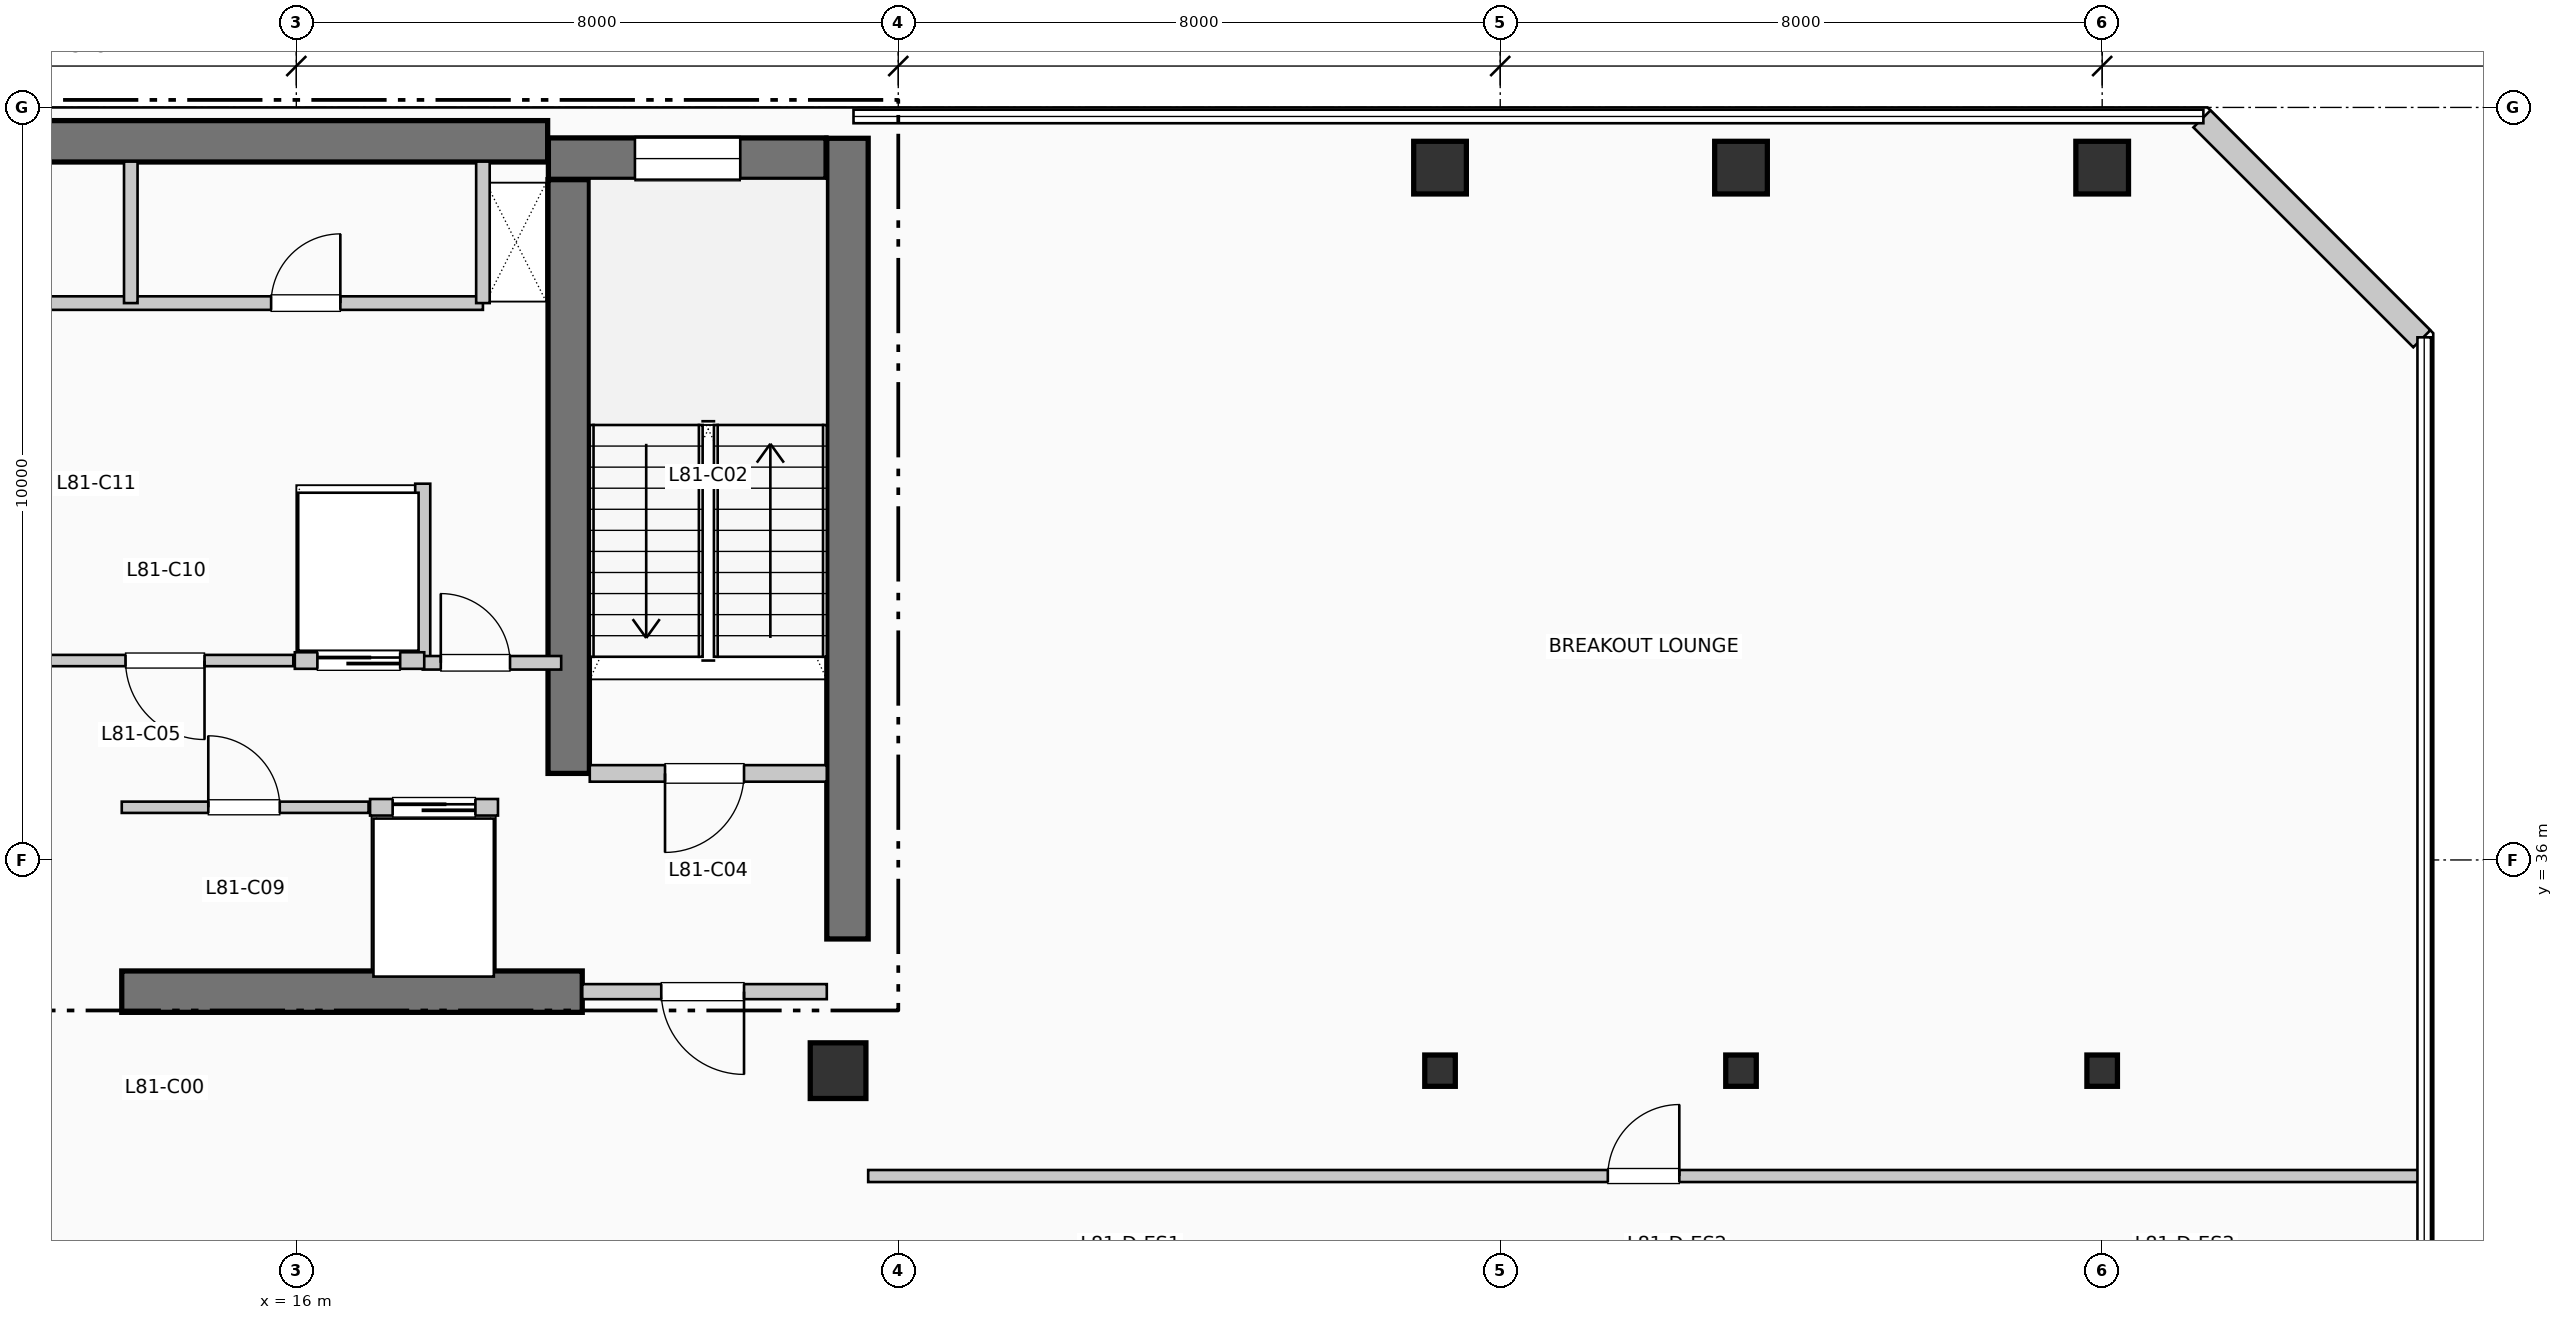
"""IFC4 building model, lengths in metres.
Left out: names, types, materials, properties, quantities, classifications, styles, units other than length and angle.
Written with IfcOpenShell. Run it as: python <this file> out.ifc"""

import sys

from ifc_helpers import new_model, si_unit, direction, frame, frame_2d, origin, origin_2d, place, context, subcontext, project, spatial, rectangle, i_section, extrude, element, fill, save


model = new_model("IFC4")
c1 = context("Model", 3, precision=1e-05, world=origin(), true_north=direction((0.0, 1.0)))
c2 = subcontext(c1, "Body", "Model", "MODEL_VIEW")
j1 = project(units=[si_unit("LENGTHUNIT", "METRE"), si_unit("PLANEANGLEUNIT", "RADIAN")], contexts=[c1])
p1 = place(None, origin())
s1 = spatial("IfcSite", under=j1, at=p1, CompositionType="ELEMENT")
p2 = place(p1, origin())
s2 = spatial("IfcBuilding", under=s1, at=p2, CompositionType="ELEMENT")
p3 = place(p2, frame((0.0, 0.0, 331.65)))
s3 = spatial("IfcBuildingStorey", under=s2, at=p3, CompositionType="ELEMENT", Elevation=331.65)
p4 = place(p3, frame((5.36, 45.55, 0.0), z_axis=(0.0, 0.0, 1.0), x_axis=(1.0, 0.0, 0.0)))
e1 = element("IfcWall", 1, at=p4, inside=s3, PredefinedType="SHEAR", context=c2, shape_type="SweptSolid", body=[
    extrude(rectangle(XDim=13.98, YDim=0.55, at=frame_2d((6.99, 0.0))), origin(), (0.0, 0.0, 1.0), 3.96),
])
p5 = place(p3, frame((23.325, 34.95, 0.0), z_axis=(0.0, 0.0, 1.0), x_axis=(0.0, 1.0, 0.0)))
e2 = element("IfcWall", 2, at=p5, inside=s3, PredefinedType="SHEAR", context=c2, shape_type="SweptSolid", body=[
    extrude(rectangle(XDim=10.64, YDim=0.55, at=frame_2d((5.32, 0.0))), origin(), (0.0, 0.0, 1.0), 3.96),
])
p6 = place(p3, frame((13.68, 34.25, 0.0), z_axis=(0.0, 0.0, 1.0), x_axis=(1.0, 0.0, 0.0)))
e3 = element("IfcWall", 3, at=p6, inside=s3, PredefinedType="SHEAR", context=c2, shape_type="SweptSolid", body=[
    extrude(rectangle(XDim=6.12, YDim=0.55, at=frame_2d((3.06, 0.0))), origin(), (0.0, 0.0, 1.0), 3.96),
])
p7 = place(p3, frame((19.62, 37.15, 0.0), z_axis=(0.0, 0.0, 1.0), x_axis=(0.0, 1.0, 0.0)))
e4 = element("IfcWall", 4, at=p7, inside=s3, PredefinedType="SHEAR", context=c2, shape_type="SweptSolid", body=[
    extrude(rectangle(XDim=7.89, YDim=0.55, at=frame_2d((3.945, 0.0))), origin(), (0.0, 0.0, 1.0), 3.96),
])
p8 = place(p3, frame((19.35, 45.32, 0.0), z_axis=(0.0, 0.0, 1.0), x_axis=(1.0, 0.0, 0.0)))
e5 = element("IfcWall", 5, at=p8, inside=s3, PredefinedType="SHEAR", context=c2, shape_type="SweptSolid", body=[
    extrude(rectangle(XDim=3.69, YDim=0.55, at=frame_2d((1.845, 0.0))), origin(), (0.0, 0.0, 1.0), 3.96),
])
p9 = place(p8, frame((1.15, 0.0, 1.05)))
e6 = element("IfcOpeningElement", 6, at=p9, cuts=e5, PredefinedType="OPENING", context=c2, shape_type="SweptSolid", body=[
    extrude(rectangle(XDim=1.4, YDim=1.8, at=frame_2d((0.7, 0.9))), frame((0.0, 0.285, 0.0), z_axis=(0.0, -1.0, 0.0), x_axis=(1.0, 0.0, 0.0)), (0.0, 0.0, 1.0), 0.57),
])
p10 = place(p3, frame((23.2, 33.2, 0.0), z_axis=(0.0, 0.0, 1.0), x_axis=(1.0, 0.0, 0.0)))
e7 = element("IfcColumn", 7, at=p10, inside=s3, PredefinedType="COLUMN", context=c2, shape_type="SweptSolid", body=[
    extrude(rectangle(XDim=0.74, YDim=0.74, at=origin_2d()), origin(), (0.0, 0.0, 1.0), 3.96),
])
p11 = place(p3, frame((31.2, 33.2, 0.0), z_axis=(0.0, 0.0, 1.0), x_axis=(1.0, 0.0, 0.0)))
e8 = element("IfcColumn", 8, at=p11, inside=s3, PredefinedType="COLUMN", context=c2, shape_type="SweptSolid", body=[
    extrude(i_section(OverallWidth=0.406, OverallDepth=0.416, WebThickness=0.022, FlangeThickness=0.036, at=origin_2d()), origin(), (0.0, 0.0, 1.0), 3.96),
])
p12 = place(p3, frame((31.2, 45.2, 0.0), z_axis=(0.0, 0.0, 1.0), x_axis=(1.0, 0.0, 0.0)))
e9 = element("IfcColumn", 9, at=p12, inside=s3, PredefinedType="COLUMN", context=c2, shape_type="SweptSolid", body=[
    extrude(rectangle(XDim=0.7, YDim=0.7, at=origin_2d()), origin(), (0.0, 0.0, 1.0), 3.96),
])
p13 = place(p3, frame((35.2, 33.2, 0.0), z_axis=(0.0, 0.0, 1.0), x_axis=(1.0, 0.0, 0.0)))
e10 = element("IfcColumn", 10, at=p13, inside=s3, PredefinedType="COLUMN", context=c2, shape_type="SweptSolid", body=[
    extrude(i_section(OverallWidth=0.406, OverallDepth=0.416, WebThickness=0.022, FlangeThickness=0.036, at=origin_2d()), origin(), (0.0, 0.0, 1.0), 3.96),
])
p14 = place(p3, frame((35.2, 45.2, 0.0), z_axis=(0.0, 0.0, 1.0), x_axis=(1.0, 0.0, 0.0)))
e11 = element("IfcColumn", 11, at=p14, inside=s3, PredefinedType="COLUMN", context=c2, shape_type="SweptSolid", body=[
    extrude(rectangle(XDim=0.7, YDim=0.7, at=origin_2d()), origin(), (0.0, 0.0, 1.0), 3.96),
])
p15 = place(p3, frame((40.0, 33.2, 0.0), z_axis=(0.0, 0.0, 1.0), x_axis=(1.0, 0.0, 0.0)))
e12 = element("IfcColumn", 12, at=p15, inside=s3, PredefinedType="COLUMN", context=c2, shape_type="SweptSolid", body=[
    extrude(i_section(OverallWidth=0.406, OverallDepth=0.416, WebThickness=0.022, FlangeThickness=0.036, at=origin_2d()), origin(), (0.0, 0.0, 1.0), 3.96),
])
p16 = place(p3, frame((40.0, 45.2, 0.0), z_axis=(0.0, 0.0, 1.0), x_axis=(1.0, 0.0, 0.0)))
e13 = element("IfcColumn", 13, at=p16, inside=s3, PredefinedType="COLUMN", context=c2, shape_type="SweptSolid", body=[
    extrude(rectangle(XDim=0.7, YDim=0.7, at=origin_2d()), origin(), (0.0, 0.0, 1.0), 3.96),
])
p17 = place(p3, frame((44.248, 42.926, 0.0), z_axis=(0.0, 0.0, 1.0), x_axis=(-0.707136318428, 0.707077242712, 0.0)))
e14 = element("IfcWall", 14, at=p17, inside=s3, PredefinedType="SOLIDWALL", context=c2, shape_type="SweptSolid", body=[
    extrude(rectangle(XDim=4.133, YDim=0.32, at=frame_2d((2.066, 0.0))), origin(), (0.0, 0.0, 1.0), 3.74),
])
p18 = place(p3, frame((19.9, 37.15, 0.0), z_axis=(0.0, 0.0, 1.0), x_axis=(1.0, 0.0, 0.0)))
e15 = element("IfcWall", 15, at=p18, inside=s3, PredefinedType="PARTITIONING", context=c2, shape_type="SweptSolid", body=[
    extrude(rectangle(XDim=3.15, YDim=0.22, at=frame_2d((1.575, 0.0))), origin(), (0.0, 0.0, 1.0), 3.74),
])
p19 = place(p18, frame((2.05, 0.0, 0.0), z_axis=(0.0, 0.0, 1.0), x_axis=(-1.0, 0.0, 0.0)))
e16 = element("IfcOpeningElement", 16, at=p19, cuts=e15, PredefinedType="OPENING", context=c2, shape_type="SweptSolid", body=[
    extrude(rectangle(XDim=1.05, YDim=2.15, at=frame_2d((0.525, 1.075))), frame((0.0, 0.12, 0.0), z_axis=(0.0, -1.0, 0.0), x_axis=(1.0, 0.0, 0.0)), (0.0, 0.0, 1.0), 0.24),
])
p20 = place(p3, frame((19.8, 34.25, 0.0), z_axis=(0.0, 0.0, 1.0), x_axis=(1.0, 0.0, 0.0)))
e17 = element("IfcWall", 17, at=p20, inside=s3, PredefinedType="PARTITIONING", context=c2, shape_type="SweptSolid", body=[
    extrude(rectangle(XDim=3.25, YDim=0.2, at=frame_2d((1.625, 0.0))), origin(), (0.0, 0.0, 1.0), 3.74),
])
p21 = place(p20, frame((2.15, 0.0, 0.0), z_axis=(0.0, 0.0, 1.0), x_axis=(-1.0, 0.0, 0.0)))
e18 = element("IfcOpeningElement", 18, at=p21, cuts=e17, PredefinedType="OPENING", context=c2, shape_type="SweptSolid", body=[
    extrude(rectangle(XDim=1.1, YDim=2.15, at=frame_2d((0.55, 1.075))), frame((0.0, 0.11, 0.0), z_axis=(0.0, -1.0, 0.0), x_axis=(1.0, 0.0, 0.0)), (0.0, 0.0, 1.0), 0.22),
])
p22 = place(p3, frame((17.68, 38.65, 0.0), z_axis=(0.0, 0.0, 1.0), x_axis=(0.0, 1.0, 0.0)))
e19 = element("IfcWall", 19, at=p22, inside=s3, PredefinedType="PARTITIONING", context=c2, shape_type="SweptSolid", body=[
    extrude(rectangle(XDim=2.35, YDim=0.2, at=frame_2d((1.175, 0.0))), origin(), (0.0, 0.0, 1.0), 3.74),
])
p23 = place(p3, frame((17.68, 38.62, 0.0), z_axis=(0.0, 0.0, 1.0), x_axis=(1.0, 0.0, 0.0)))
e20 = element("IfcWall", 20, at=p23, inside=s3, PredefinedType="PARTITIONING", context=c2, shape_type="SweptSolid", body=[
    extrude(rectangle(XDim=1.84, YDim=0.18, at=frame_2d((0.92, 0.0))), origin(), (0.0, 0.0, 1.0), 3.74),
])
p24 = place(p23, frame((0.24, 0.0, 0.0)))
e21 = element("IfcOpeningElement", 21, at=p24, cuts=e20, PredefinedType="OPENING", context=c2, shape_type="SweptSolid", body=[
    extrude(rectangle(XDim=0.92, YDim=2.1, at=frame_2d((0.46, 1.05))), frame((0.0, 0.1, 0.0), z_axis=(0.0, -1.0, 0.0), x_axis=(1.0, 0.0, 0.0)), (0.0, 0.0, 1.0), 0.2),
])
p25 = place(p3, frame((13.68, 36.7, 0.0), z_axis=(0.0, 0.0, 1.0), x_axis=(1.0, 0.0, 0.0)))
e22 = element("IfcWall", 22, at=p25, inside=s3, PredefinedType="PARTITIONING", context=c2, shape_type="SweptSolid", body=[
    extrude(rectangle(XDim=3.28, YDim=0.15, at=frame_2d((1.64, 0.0))), origin(), (0.0, 0.0, 1.0), 3.74),
])
p26 = place(p25, frame((1.15, 0.0, 0.0)))
e23 = element("IfcOpeningElement", 23, at=p26, cuts=e22, PredefinedType="OPENING", context=c2, shape_type="SweptSolid", body=[
    extrude(rectangle(XDim=0.95, YDim=2.15, at=frame_2d((0.475, 1.075))), frame((0.0, 0.085, 0.0), z_axis=(0.0, -1.0, 0.0), x_axis=(1.0, 0.0, 0.0)), (0.0, 0.0, 1.0), 0.17),
])
p27 = place(p3, frame((12.58, 38.65, 0.0), z_axis=(0.0, 0.0, 1.0), x_axis=(1.0, 0.0, 0.0)))
e24 = element("IfcWall", 24, at=p27, inside=s3, PredefinedType="PARTITIONING", context=c2, shape_type="SweptSolid", body=[
    extrude(rectangle(XDim=3.38, YDim=0.15, at=frame_2d((1.69, 0.0))), origin(), (0.0, 0.0, 1.0), 3.74),
])
p28 = place(p27, frame((2.2, 0.0, 0.0), z_axis=(0.0, 0.0, 1.0), x_axis=(-1.0, 0.0, 0.0)))
e25 = element("IfcOpeningElement", 25, at=p28, cuts=e24, PredefinedType="OPENING", context=c2, shape_type="SweptSolid", body=[
    extrude(rectangle(XDim=1.05, YDim=2.15, at=frame_2d((0.525, 1.075))), frame((0.0, 0.085, 0.0), z_axis=(0.0, -1.0, 0.0), x_axis=(1.0, 0.0, 0.0)), (0.0, 0.0, 1.0), 0.17),
])
p29 = place(p3, frame((16.98, 36.7, 0.0), z_axis=(0.0, 0.0, 1.0), x_axis=(1.0, 0.0, 0.0)))
e26 = element("IfcWall", 26, at=p29, inside=s3, PredefinedType="PARTITIONING", context=c2, shape_type="SweptSolid", body=[
    extrude(rectangle(XDim=1.7, YDim=0.22, at=frame_2d((0.85, 0.0))), origin(), (0.0, 0.0, 1.0), 3.74),
])
p30 = place(p29, frame((0.3, 0.0, 0.0)))
e27 = element("IfcOpeningElement", 27, at=p30, cuts=e26, PredefinedType="OPENING", context=c2, shape_type="SweptSolid", body=[
    extrude(rectangle(XDim=1.1, YDim=2.2, at=frame_2d((0.55, 1.1))), frame((0.0, 0.12, 0.0), z_axis=(0.0, -1.0, 0.0), x_axis=(1.0, 0.0, 0.0)), (0.0, 0.0, 1.0), 0.24),
])
p31 = place(p3, frame((15.98, 38.65, 0.0), z_axis=(0.0, 0.0, 1.0), x_axis=(1.0, 0.0, 0.0)))
e28 = element("IfcWall", 28, at=p31, inside=s3, PredefinedType="PARTITIONING", context=c2, shape_type="SweptSolid", body=[
    extrude(rectangle(XDim=1.72, YDim=0.22, at=frame_2d((0.86, 0.0))), origin(), (0.0, 0.0, 1.0), 3.74),
])
p32 = place(p31, frame((0.3, 0.0, 0.0)))
e29 = element("IfcOpeningElement", 29, at=p32, cuts=e28, PredefinedType="OPENING", context=c2, shape_type="SweptSolid", body=[
    extrude(rectangle(XDim=1.1, YDim=2.2, at=frame_2d((0.55, 1.1))), frame((0.0, 0.12, 0.0), z_axis=(0.0, -1.0, 0.0), x_axis=(1.0, 0.0, 0.0)), (0.0, 0.0, 1.0), 0.24),
])
p33 = place(p3, frame((9.15, 43.4, 0.0), z_axis=(0.0, 0.0, 1.0), x_axis=(1.0, 0.0, 0.0)))
e30 = element("IfcWall", 30, at=p33, inside=s3, PredefinedType="PLUMBINGWALL", context=c2, shape_type="SweptSolid", body=[
    extrude(rectangle(XDim=9.33, YDim=0.18, at=frame_2d((4.665, 0.0))), origin(), (0.0, 0.0, 1.0), 3.74),
])
p34 = place(p33, frame((1.88, 0.0, 0.0)))
e31 = element("IfcOpeningElement", 31, at=p34, cuts=e30, PredefinedType="OPENING", context=c2, shape_type="SweptSolid", body=[
    extrude(rectangle(XDim=0.92, YDim=2.1, at=frame_2d((0.46, 1.05))), frame((0.0, 0.1, 0.0), z_axis=(0.0, -1.0, 0.0), x_axis=(1.0, 0.0, 0.0)), (0.0, 0.0, 1.0), 0.2),
])
p35 = place(p33, frame((6.515, 0.0, 0.0)))
e32 = element("IfcOpeningElement", 32, at=p35, cuts=e30, PredefinedType="OPENING", context=c2, shape_type="SweptSolid", body=[
    extrude(rectangle(XDim=0.92, YDim=2.1, at=frame_2d((0.46, 1.05))), frame((0.0, 0.1, 0.0), z_axis=(0.0, -1.0, 0.0), x_axis=(1.0, 0.0, 0.0)), (0.0, 0.0, 1.0), 0.2),
])
for number, where, z_axis, x_axis in (
    (33, (18.48, 43.4, 0.0), (0.0, 0.0, 1.0), (0.0, 1.0, 0.0)),
    (34, (13.8, 43.4, 0.0), (0.0, 0.0, 1.0), (0.0, 1.0, 0.0)),
):
    element("IfcWall", number, at=place(p3, frame(where, z_axis=z_axis, x_axis=x_axis)), inside=s3, PredefinedType="PLUMBINGWALL", context=c2, shape_type="SweptSolid", body=[
        extrude(rectangle(XDim=1.88, YDim=0.18, at=frame_2d((0.94, 0.0))), origin(), (0.0, 0.0, 1.0), 3.74),
    ])
p36 = place(p3, frame((23.6, 31.8, 0.0), z_axis=(0.0, 0.0, 1.0), x_axis=(1.0, 0.0, 0.0)))
e35 = element("IfcWall", 35, at=p36, inside=s3, PredefinedType="PARTITIONING", context=c2, shape_type="SweptSolid", body=[
    extrude(rectangle(XDim=20.61, YDim=0.16, at=frame_2d((10.305, 0.0))), origin(), (0.0, 0.0, 1.0), 3.74),
])
p37 = place(p36, frame((9.83, 0.0, 0.0)))
e36 = element("IfcOpeningElement", 36, at=p37, cuts=e35, PredefinedType="OPENING", context=c2, shape_type="SweptSolid", body=[
    extrude(rectangle(XDim=0.95, YDim=2.15, at=frame_2d((0.475, 1.075))), frame((0.0, 0.09, 0.0), z_axis=(0.0, -1.0, 0.0), x_axis=(1.0, 0.0, 0.0)), (0.0, 0.0, 1.0), 0.18),
])
p38 = place(p9, origin())
e37 = element("IfcWindow", 37, at=p38, inside=s3, PartitioningType="SINGLE_PANEL", PredefinedType="WINDOW", context=c2, shape_type="SweptSolid", body=[
    extrude(rectangle(XDim=1.4, YDim=1.8, at=frame_2d((0.7, 0.9))), frame((0.0, 0.03, 0.0), z_axis=(0.0, -1.0, 0.0), x_axis=(1.0, 0.0, 0.0)), (0.0, 0.0, 1.0), 0.06),
])
fill(e6, e37)
p39 = place(p19, origin())
e38 = element("IfcDoor", 38, at=p39, inside=s3, OperationType="SINGLE_SWING_LEFT", PredefinedType="DOOR", context=c2, shape_type="SweptSolid", body=[
    extrude(rectangle(XDim=1.05, YDim=2.15, at=frame_2d((0.525, 1.075))), frame((0.0, 0.025, 0.0), z_axis=(0.0, -1.0, 0.0), x_axis=(1.0, 0.0, 0.0)), (0.0, 0.0, 1.0), 0.05),
])
fill(e16, e38)
p40 = place(p21, origin())
e39 = element("IfcDoor", 39, at=p40, inside=s3, OperationType="SINGLE_SWING_RIGHT", PredefinedType="DOOR", context=c2, shape_type="SweptSolid", body=[
    extrude(rectangle(XDim=1.1, YDim=2.15, at=frame_2d((0.55, 1.075))), frame((0.0, 0.025, 0.0), z_axis=(0.0, -1.0, 0.0), x_axis=(1.0, 0.0, 0.0)), (0.0, 0.0, 1.0), 0.05),
])
fill(e18, e39)
p41 = place(p24, origin())
e40 = element("IfcDoor", 40, at=p41, inside=s3, OperationType="SINGLE_SWING_LEFT", PredefinedType="DOOR", context=c2, shape_type="SweptSolid", body=[
    extrude(rectangle(XDim=0.92, YDim=2.1, at=frame_2d((0.46, 1.05))), frame((0.0, 0.025, 0.0), z_axis=(0.0, -1.0, 0.0), x_axis=(1.0, 0.0, 0.0)), (0.0, 0.0, 1.0), 0.05),
])
fill(e21, e40)
p42 = place(p26, origin())
e41 = element("IfcDoor", 41, at=p42, inside=s3, OperationType="SINGLE_SWING_LEFT", PredefinedType="DOOR", context=c2, shape_type="SweptSolid", body=[
    extrude(rectangle(XDim=0.95, YDim=2.15, at=frame_2d((0.475, 1.075))), frame((0.0, 0.025, 0.0), z_axis=(0.0, -1.0, 0.0), x_axis=(1.0, 0.0, 0.0)), (0.0, 0.0, 1.0), 0.05),
])
fill(e23, e41)
p43 = place(p28, origin())
e42 = element("IfcDoor", 42, at=p43, inside=s3, OperationType="SINGLE_SWING_RIGHT", PredefinedType="DOOR", context=c2, shape_type="SweptSolid", body=[
    extrude(rectangle(XDim=1.05, YDim=2.15, at=frame_2d((0.525, 1.075))), frame((0.0, 0.025, 0.0), z_axis=(0.0, -1.0, 0.0), x_axis=(1.0, 0.0, 0.0)), (0.0, 0.0, 1.0), 0.05),
])
fill(e25, e42)
p44 = place(p30, origin())
e43 = element("IfcDoor", 43, at=p44, inside=s3, OperationType="SLIDING_TO_LEFT", PredefinedType="DOOR", context=c2, shape_type="SweptSolid", body=[
    extrude(rectangle(XDim=1.1, YDim=2.2, at=frame_2d((0.55, 1.1))), frame((0.0, 0.025, 0.0), z_axis=(0.0, -1.0, 0.0), x_axis=(1.0, 0.0, 0.0)), (0.0, 0.0, 1.0), 0.05),
])
fill(e27, e43)
p45 = place(p32, origin())
e44 = element("IfcDoor", 44, at=p45, inside=s3, OperationType="SLIDING_TO_LEFT", PredefinedType="DOOR", context=c2, shape_type="SweptSolid", body=[
    extrude(rectangle(XDim=1.1, YDim=2.2, at=frame_2d((0.55, 1.1))), frame((0.0, 0.025, 0.0), z_axis=(0.0, -1.0, 0.0), x_axis=(1.0, 0.0, 0.0)), (0.0, 0.0, 1.0), 0.05),
])
fill(e29, e44)
p46 = place(p35, origin())
e45 = element("IfcDoor", 45, at=p46, inside=s3, OperationType="SINGLE_SWING_RIGHT", PredefinedType="DOOR", context=c2, shape_type="SweptSolid", body=[
    extrude(rectangle(XDim=0.92, YDim=2.1, at=frame_2d((0.46, 1.05))), frame((0.0, 0.025, 0.0), z_axis=(0.0, -1.0, 0.0), x_axis=(1.0, 0.0, 0.0)), (0.0, 0.0, 1.0), 0.05),
])
fill(e32, e45)
p47 = place(p37, origin())
e46 = element("IfcDoor", 46, at=p47, inside=s3, OperationType="SINGLE_SWING_RIGHT", PredefinedType="DOOR", context=c2, shape_type="SweptSolid", body=[
    extrude(rectangle(XDim=0.95, YDim=2.15, at=frame_2d((0.475, 1.075))), frame((0.0, 0.025, 0.0), z_axis=(0.0, -1.0, 0.0), x_axis=(1.0, 0.0, 0.0)), (0.0, 0.0, 1.0), 0.05),
])
fill(e36, e46)
save(model, sys.argv[1])
